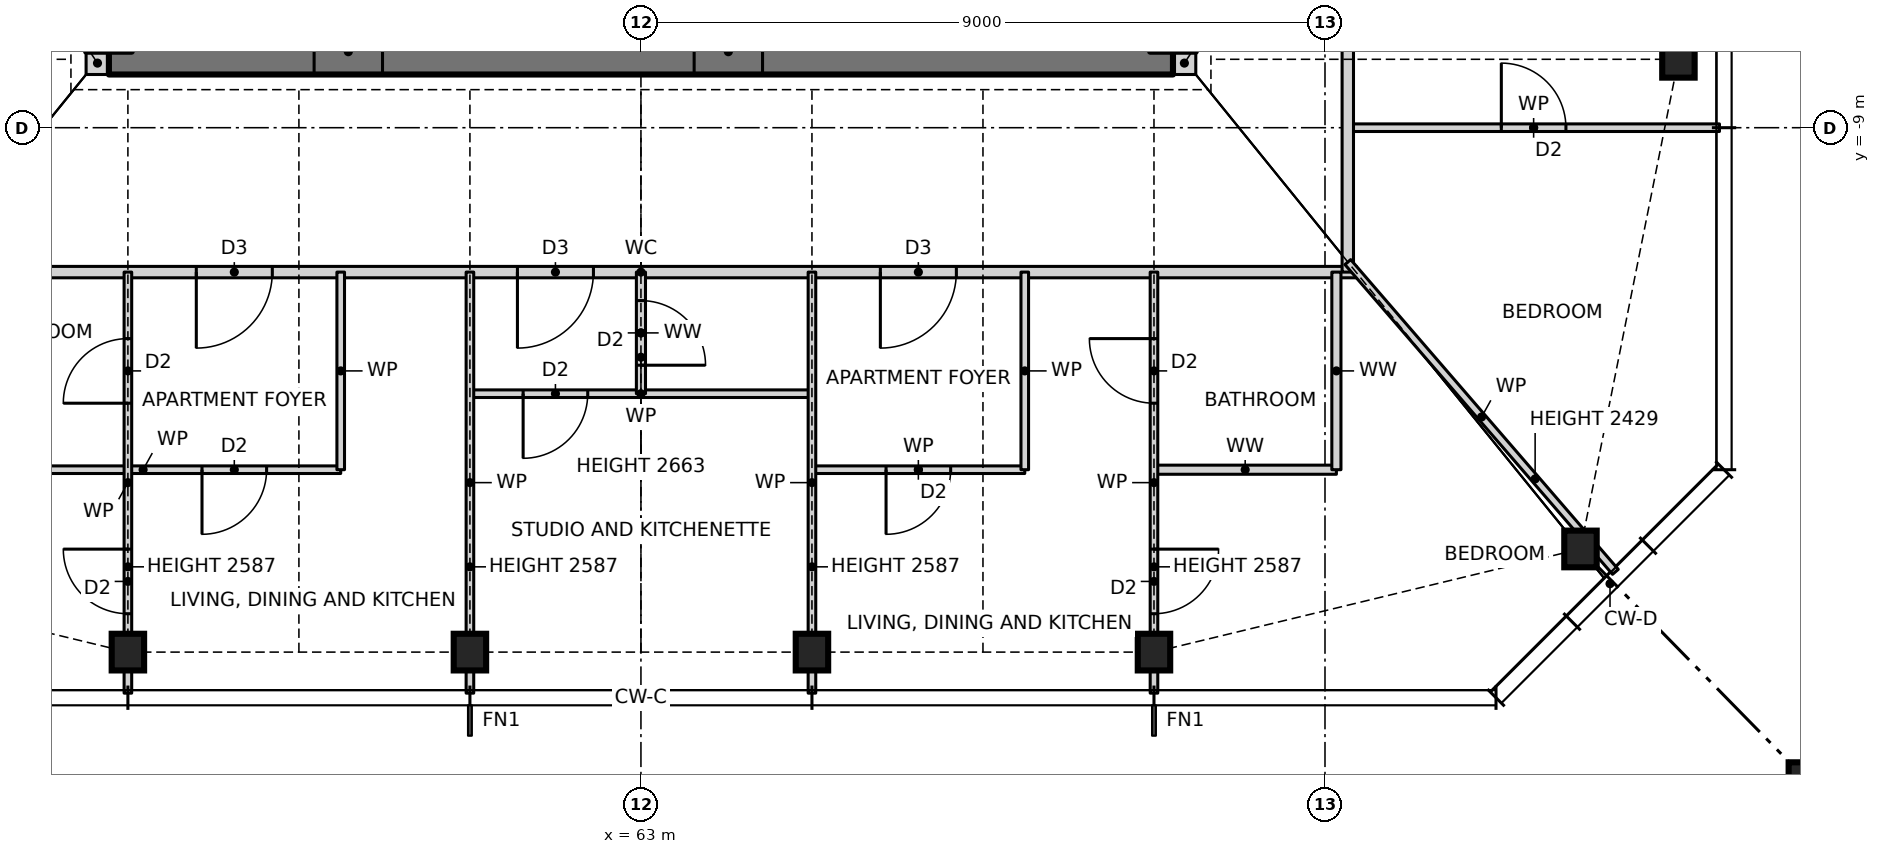
"""IFC4 building model, lengths in metres.
Left out: names, types, materials, properties, quantities, classifications, styles, units other than length and angle.
Written with IfcOpenShell. Run it as: python <this file> out.ifc"""

import sys

from ifc_helpers import new_model, si_unit, direction, frame, frame_2d, origin, origin_2d, place, context, subcontext, project, spatial, rectangle, hollow_rectangle, i_section, extrude, element, fill, save


model = new_model("IFC4")
c1 = context("Model", 3, precision=1e-05, world=origin(), true_north=direction((0.0, 1.0)))
c2 = subcontext(c1, "Body", "Model", "MODEL_VIEW")
j1 = project(units=[si_unit("LENGTHUNIT", "METRE"), si_unit("PLANEANGLEUNIT", "RADIAN")], contexts=[c1])
p1 = place(None, origin())
s1 = spatial("IfcSite", under=j1, at=p1, CompositionType="ELEMENT")
p2 = place(p1, origin())
s2 = spatial("IfcBuilding", under=s1, at=p2, CompositionType="ELEMENT")
p3 = place(p2, frame((0.0, 0.0, 84.0)))
s3 = spatial("IfcBuildingStorey", under=s2, at=p3, CompositionType="ELEMENT", Elevation=84.0)
for number, where, z_axis, x_axis in (
    (1, (56.25, -15.9, 0.0), (0.0, 0.0, 1.0), (1.0, 0.0, 0.0)),
    (2, (60.75, -15.9, 0.0), (0.0, 0.0, 1.0), (1.0, 0.0, 0.0)),
    (3, (65.25, -15.9, 0.0), (0.0, 0.0, 1.0), (1.0, 0.0, 0.0)),
    (4, (69.75, -15.9, 0.0), (0.0, 0.0, 1.0), (1.0, 0.0, 0.0)),
    (5, (75.361, -14.543, 0.0), (0.0, 0.0, 1.0), (1.0, 0.0, 0.0)),
    (6, (76.65, -8.1, 0.0), (0.0, 0.0, 1.0), (1.0, 0.0, 0.0)),
):
    element("IfcColumn", number, at=place(p3, frame(where, z_axis=z_axis, x_axis=x_axis)), inside=s3, PredefinedType="COLUMN", context=c2, shape_type="SweptSolid", body=[
        extrude(i_section(OverallWidth=0.427, OverallDepth=0.483, WebThickness=0.051, FlangeThickness=0.082, at=origin_2d()), origin(), (0.0, 0.0, 1.0), 3.5),
    ])
p4 = place(p3, frame((78.65, -17.9, 0.0), z_axis=(0.0, 0.0, 1.0), x_axis=(1.0, 0.0, 0.0)))
e7 = element("IfcColumn", 7, at=p4, inside=s3, PredefinedType="COLUMN", context=c2, shape_type="SweptSolid", body=[
    extrude(hollow_rectangle(XDim=1.1, YDim=1.1, WallThickness=0.06, at=origin_2d()), origin(), (0.0, 0.0, 1.0), 3.5),
])
for number, where, z_axis, x_axis in (
    (8, (55.7, -8.15, 0.0), (0.0, 0.0, 1.0), (1.0, 0.0, 0.0)),
    (9, (70.0, -8.15, 0.0), (0.0, 0.0, 1.0), (1.0, 0.0, 0.0)),
):
    element("IfcWall", number, at=place(p3, frame(where, z_axis=z_axis, x_axis=x_axis)), inside=s3, PredefinedType="SOLIDWALL", context=c2, shape_type="SweptSolid", body=[
        extrude(rectangle(XDim=0.3, YDim=0.3, at=frame_2d((0.15, 0.0))), origin(), (0.0, 0.0, 1.0), 3.5),
    ])
p5 = place(p3, frame((56.0, -8.0, 0.0), z_axis=(0.0, 0.0, 1.0), x_axis=(1.0, 0.0, 0.0)))
e10 = element("IfcWall", 10, at=p5, inside=s3, PredefinedType="SHEAR", context=c2, shape_type="SweptSolid", body=[
    extrude(rectangle(XDim=14.0, YDim=0.6, at=frame_2d((7.0, 0.0))), origin(), (0.0, 0.0, 1.0), 3.5),
])
p6 = place(p5, frame((2.7, 0.0, 0.0)))
e11 = element("IfcOpeningElement", 11, at=p6, cuts=e10, PredefinedType="OPENING", context=c2, shape_type="SweptSolid", body=[
    extrude(rectangle(XDim=0.9, YDim=2.1, at=frame_2d((0.45, 1.05))), frame((0.0, 0.31, 0.0), z_axis=(0.0, -1.0, 0.0), x_axis=(1.0, 0.0, 0.0)), (0.0, 0.0, 1.0), 0.62),
])
p7 = place(p5, frame((7.7, 0.0, 0.0)))
e12 = element("IfcOpeningElement", 12, at=p7, cuts=e10, PredefinedType="OPENING", context=c2, shape_type="SweptSolid", body=[
    extrude(rectangle(XDim=0.9, YDim=2.1, at=frame_2d((0.45, 1.05))), frame((0.0, 0.31, 0.0), z_axis=(0.0, -1.0, 0.0), x_axis=(1.0, 0.0, 0.0)), (0.0, 0.0, 1.0), 0.62),
])
p8 = place(p3, frame((53.85, -13.5, 0.0), z_axis=(0.0, 0.0, 1.0), x_axis=(1.0, 0.0, 0.0)))
e13 = element("IfcWall", 13, at=p8, inside=s3, PredefinedType="PARTITIONING", context=c2, shape_type="SweptSolid", body=[
    extrude(rectangle(XDim=5.2, YDim=0.1, at=frame_2d((2.6, 0.0))), origin(), (0.0, 0.0, 1.0), 3.27),
])
p9 = place(p8, frame((3.375, 0.0, 0.0)))
e14 = element("IfcOpeningElement", 14, at=p9, cuts=e13, PredefinedType="OPENING", context=c2, shape_type="SweptSolid", body=[
    extrude(rectangle(XDim=0.85, YDim=2.1, at=frame_2d((0.425, 1.05))), frame((0.0, 0.06, 0.0), z_axis=(0.0, -1.0, 0.0), x_axis=(1.0, 0.0, 0.0)), (0.0, 0.0, 1.0), 0.12),
])
p10 = place(p3, frame((65.25, -13.5, 0.0), z_axis=(0.0, 0.0, 1.0), x_axis=(1.0, 0.0, 0.0)))
e15 = element("IfcWall", 15, at=p10, inside=s3, PredefinedType="PARTITIONING", context=c2, shape_type="SweptSolid", body=[
    extrude(rectangle(XDim=2.8, YDim=0.1, at=frame_2d((1.4, 0.0))), origin(), (0.0, 0.0, 1.0), 3.27),
])
p11 = place(p10, frame((0.975, 0.0, 0.0)))
e16 = element("IfcOpeningElement", 16, at=p11, cuts=e15, PredefinedType="OPENING", context=c2, shape_type="SweptSolid", body=[
    extrude(rectangle(XDim=0.85, YDim=2.1, at=frame_2d((0.425, 1.05))), frame((0.0, 0.06, 0.0), z_axis=(0.0, -1.0, 0.0), x_axis=(1.0, 0.0, 0.0)), (0.0, 0.0, 1.0), 0.12),
])
p12 = place(p3, frame((69.75, -13.5, 0.0), z_axis=(0.0, 0.0, 1.0), x_axis=(1.0, 0.0, 0.0)))
e17 = element("IfcWall", 17, at=p12, inside=s3, PredefinedType="PARTITIONING", context=c2, shape_type="SweptSolid", body=[
    extrude(rectangle(XDim=2.4, YDim=0.12, at=frame_2d((1.2, 0.0))), origin(), (0.0, 0.0, 1.0), 3.27),
])
p13 = place(p3, frame((60.75, -12.5, 0.0), z_axis=(0.0, 0.0, 1.0), x_axis=(1.0, 0.0, 0.0)))
e18 = element("IfcWall", 18, at=p13, inside=s3, PredefinedType="PARTITIONING", context=c2, shape_type="SweptSolid", body=[
    extrude(rectangle(XDim=4.5, YDim=0.1, at=frame_2d((2.25, 0.0))), origin(), (0.0, 0.0, 1.0), 3.27),
])
p14 = place(p13, frame((0.7, 0.0, 0.0)))
e19 = element("IfcOpeningElement", 19, at=p14, cuts=e18, PredefinedType="OPENING", context=c2, shape_type="SweptSolid", body=[
    extrude(rectangle(XDim=0.85, YDim=2.1, at=frame_2d((0.425, 1.05))), frame((0.0, 0.06, 0.0), z_axis=(0.0, -1.0, 0.0), x_axis=(1.0, 0.0, 0.0)), (0.0, 0.0, 1.0), 0.12),
])
p15 = place(p3, frame((53.586, -10.9, 0.0), z_axis=(0.0, 0.0, 1.0), x_axis=(1.0, 0.0, 0.0)))
e20 = element("IfcWall", 20, at=p15, inside=s3, PredefinedType="PARTITIONING", context=c2, shape_type="SweptSolid", body=[
    extrude(rectangle(XDim=18.828, YDim=0.15, at=frame_2d((9.414, 0.0))), origin(), (0.0, 0.0, 1.0), 3.27),
])
p16 = place(p15, frame((3.564, 0.0, 0.0)))
e21 = element("IfcOpeningElement", 21, at=p16, cuts=e20, PredefinedType="OPENING", context=c2, shape_type="SweptSolid", body=[
    extrude(rectangle(XDim=1.0, YDim=2.1, at=frame_2d((0.5, 1.05))), frame((0.0, 0.085, 0.0), z_axis=(0.0, -1.0, 0.0), x_axis=(1.0, 0.0, 0.0)), (0.0, 0.0, 1.0), 0.17),
])
p17 = place(p15, frame((7.789, 0.0, 0.0)))
e22 = element("IfcOpeningElement", 22, at=p17, cuts=e20, PredefinedType="OPENING", context=c2, shape_type="SweptSolid", body=[
    extrude(rectangle(XDim=1.0, YDim=2.1, at=frame_2d((0.5, 1.05))), frame((0.0, 0.085, 0.0), z_axis=(0.0, -1.0, 0.0), x_axis=(1.0, 0.0, 0.0)), (0.0, 0.0, 1.0), 0.17),
])
p18 = place(p15, frame((12.564, 0.0, 0.0)))
e23 = element("IfcOpeningElement", 23, at=p18, cuts=e20, PredefinedType="OPENING", context=c2, shape_type="SweptSolid", body=[
    extrude(rectangle(XDim=1.0, YDim=2.1, at=frame_2d((0.5, 1.05))), frame((0.0, 0.085, 0.0), z_axis=(0.0, -1.0, 0.0), x_axis=(1.0, 0.0, 0.0)), (0.0, 0.0, 1.0), 0.17),
])
p19 = place(p3, frame((72.3, -9.0, 0.0), z_axis=(0.0, 0.0, 1.0), x_axis=(1.0, 0.0, 0.0)))
e24 = element("IfcWall", 24, at=p19, inside=s3, PredefinedType="PARTITIONING", context=c2, shape_type="SweptSolid", body=[
    extrude(rectangle(XDim=4.89, YDim=0.1, at=frame_2d((2.445, 0.0))), origin(), (0.0, 0.0, 1.0), 3.27),
])
p20 = place(p19, frame((2.02, 0.0, 0.0)))
e25 = element("IfcOpeningElement", 25, at=p20, cuts=e24, PredefinedType="OPENING", context=c2, shape_type="SweptSolid", body=[
    extrude(rectangle(XDim=0.85, YDim=2.1, at=frame_2d((0.425, 1.05))), frame((0.0, 0.06, 0.0), z_axis=(0.0, -1.0, 0.0), x_axis=(1.0, 0.0, 0.0)), (0.0, 0.0, 1.0), 0.12),
])
p21 = place(p3, frame((72.3, -10.9, 0.0), z_axis=(0.0, 0.0, 1.0), x_axis=(0.0, 1.0, 0.0)))
e26 = element("IfcWall", 26, at=p21, inside=s3, PredefinedType="PARTITIONING", context=c2, shape_type="SweptSolid", body=[
    extrude(rectangle(XDim=21.668, YDim=0.15, at=frame_2d((10.834, 0.0))), origin(), (0.0, 0.0, 1.0), 3.27),
])
p22 = place(p21, frame((10.4, 0.0, 0.0)))
e27 = element("IfcOpeningElement", 27, at=p22, cuts=e26, PredefinedType="OPENING", context=c2, shape_type="SweptSolid", body=[
    extrude(rectangle(XDim=1.0, YDim=2.1, at=frame_2d((0.5, 1.05))), frame((0.0, 0.085, 0.0), z_axis=(0.0, -1.0, 0.0), x_axis=(1.0, 0.0, 0.0)), (0.0, 0.0, 1.0), 0.17),
])
p23 = place(p3, frame((72.15, -13.5, 0.0), z_axis=(0.0, 0.0, 1.0), x_axis=(0.0, 1.0, 0.0)))
e28 = element("IfcWall", 28, at=p23, inside=s3, PredefinedType="PARTITIONING", context=c2, shape_type="SweptSolid", body=[
    extrude(rectangle(XDim=2.6, YDim=0.12, at=frame_2d((1.3, 0.0))), origin(), (0.0, 0.0, 1.0), 3.27),
])
p24 = place(p3, frame((69.75, -16.44, 0.0), z_axis=(0.0, 0.0, 1.0), x_axis=(0.0, 1.0, 0.0)))
e29 = element("IfcWall", 29, at=p24, inside=s3, PredefinedType="PARTITIONING", context=c2, shape_type="SweptSolid", body=[
    extrude(rectangle(XDim=5.54, YDim=0.1, at=frame_2d((2.77, 0.0))), origin(), (0.0, 0.0, 1.0), 2.587),
])
p25 = place(p24, frame((3.815, 0.0, 0.0)))
e30 = element("IfcOpeningElement", 30, at=p25, cuts=e29, PredefinedType="OPENING", context=c2, shape_type="SweptSolid", body=[
    extrude(rectangle(XDim=0.85, YDim=2.1, at=frame_2d((0.425, 1.05))), frame((0.0, 0.06, 0.0), z_axis=(0.0, -1.0, 0.0), x_axis=(1.0, 0.0, 0.0)), (0.0, 0.0, 1.0), 0.12),
])
p26 = place(p24, frame((1.045, 0.0, 0.0)))
e31 = element("IfcOpeningElement", 31, at=p26, cuts=e29, PredefinedType="OPENING", context=c2, shape_type="SweptSolid", body=[
    extrude(rectangle(XDim=0.85, YDim=2.1, at=frame_2d((0.425, 1.05))), frame((0.0, 0.06, 0.0), z_axis=(0.0, -1.0, 0.0), x_axis=(1.0, 0.0, 0.0)), (0.0, 0.0, 1.0), 0.12),
])
p27 = place(p3, frame((68.05, -13.5, 0.0), z_axis=(0.0, 0.0, 1.0), x_axis=(0.0, 1.0, 0.0)))
e32 = element("IfcWall", 32, at=p27, inside=s3, PredefinedType="PARTITIONING", context=c2, shape_type="SweptSolid", body=[
    extrude(rectangle(XDim=2.6, YDim=0.1, at=frame_2d((1.3, 0.0))), origin(), (0.0, 0.0, 1.0), 3.27),
])
p28 = place(p3, frame((65.25, -16.44, 0.0), z_axis=(0.0, 0.0, 1.0), x_axis=(0.0, 1.0, 0.0)))
e33 = element("IfcWall", 33, at=p28, inside=s3, PredefinedType="PARTITIONING", context=c2, shape_type="SweptSolid", body=[
    extrude(rectangle(XDim=5.54, YDim=0.1, at=frame_2d((2.77, 0.0))), origin(), (0.0, 0.0, 1.0), 2.587),
])
p29 = place(p3, frame((63.0, -12.5, 0.0), z_axis=(0.0, 0.0, 1.0), x_axis=(0.0, 1.0, 0.0)))
e34 = element("IfcWall", 34, at=p29, inside=s3, PredefinedType="PARTITIONING", context=c2, shape_type="SweptSolid", body=[
    extrude(rectangle(XDim=1.6, YDim=0.12, at=frame_2d((0.8, 0.0))), origin(), (0.0, 0.0, 1.0), 2.663),
])
p30 = place(p29, frame((0.375, 0.0, 0.0)))
e35 = element("IfcOpeningElement", 35, at=p30, cuts=e34, PredefinedType="OPENING", context=c2, shape_type="SweptSolid", body=[
    extrude(rectangle(XDim=0.85, YDim=2.1, at=frame_2d((0.425, 1.05))), frame((0.0, 0.07, 0.0), z_axis=(0.0, -1.0, 0.0), x_axis=(1.0, 0.0, 0.0)), (0.0, 0.0, 1.0), 0.14),
])
p31 = place(p3, frame((60.75, -16.44, 0.0), z_axis=(0.0, 0.0, 1.0), x_axis=(0.0, 1.0, 0.0)))
e36 = element("IfcWall", 36, at=p31, inside=s3, PredefinedType="PARTITIONING", context=c2, shape_type="SweptSolid", body=[
    extrude(rectangle(XDim=5.54, YDim=0.1, at=frame_2d((2.77, 0.0))), origin(), (0.0, 0.0, 1.0), 2.587),
])
p32 = place(p3, frame((59.05, -13.5, 0.0), z_axis=(0.0, 0.0, 1.0), x_axis=(0.0, 1.0, 0.0)))
e37 = element("IfcWall", 37, at=p32, inside=s3, PredefinedType="PARTITIONING", context=c2, shape_type="SweptSolid", body=[
    extrude(rectangle(XDim=2.6, YDim=0.1, at=frame_2d((1.3, 0.0))), origin(), (0.0, 0.0, 1.0), 3.27),
])
p33 = place(p3, frame((56.25, -16.44, 0.0), z_axis=(0.0, 0.0, 1.0), x_axis=(0.0, 1.0, 0.0)))
e38 = element("IfcWall", 38, at=p33, inside=s3, PredefinedType="PARTITIONING", context=c2, shape_type="SweptSolid", body=[
    extrude(rectangle(XDim=5.54, YDim=0.1, at=frame_2d((2.77, 0.0))), origin(), (0.0, 0.0, 1.0), 2.587),
])
p34 = place(p33, frame((3.815, 0.0, 0.0)))
e39 = element("IfcOpeningElement", 39, at=p34, cuts=e38, PredefinedType="OPENING", context=c2, shape_type="SweptSolid", body=[
    extrude(rectangle(XDim=0.85, YDim=2.1, at=frame_2d((0.425, 1.05))), frame((0.0, 0.06, 0.0), z_axis=(0.0, -1.0, 0.0), x_axis=(1.0, 0.0, 0.0)), (0.0, 0.0, 1.0), 0.12),
])
p35 = place(p33, frame((1.045, 0.0, 0.0)))
e40 = element("IfcOpeningElement", 40, at=p35, cuts=e38, PredefinedType="OPENING", context=c2, shape_type="SweptSolid", body=[
    extrude(rectangle(XDim=0.85, YDim=2.1, at=frame_2d((0.425, 1.05))), frame((0.0, 0.06, 0.0), z_axis=(0.0, -1.0, 0.0), x_axis=(1.0, 0.0, 0.0)), (0.0, 0.0, 1.0), 0.12),
])
p36 = place(p3, frame((75.821, -14.844, 0.0), z_axis=(0.0, 0.0, 1.0), x_axis=(-0.653713095188, 0.756742485381, 0.0)))
e41 = element("IfcWall", 41, at=p36, inside=s3, PredefinedType="PARTITIONING", context=c2, shape_type="SweptSolid", body=[
    extrude(rectangle(XDim=5.386, YDim=0.1, at=frame_2d((2.693, 0.0))), origin(), (0.0, 0.0, 1.0), 2.429),
])
p37 = place(p16, frame((1.0, 0.0, 0.0), z_axis=(0.0, 0.0, 1.0), x_axis=(-1.0, 0.0, 0.0)))
e42 = element("IfcDoor", 42, at=p37, inside=s3, OperationType="SINGLE_SWING_RIGHT", PredefinedType="DOOR", context=c2, shape_type="SweptSolid", body=[
    extrude(rectangle(XDim=1.0, YDim=2.1, at=frame_2d((0.5, 1.05))), frame((0.0, 0.025, 0.0), z_axis=(0.0, -1.0, 0.0), x_axis=(1.0, 0.0, 0.0)), (0.0, 0.0, 1.0), 0.05),
])
fill(e21, e42)
p38 = place(p9, frame((0.85, 0.0, 0.0), z_axis=(0.0, 0.0, 1.0), x_axis=(-1.0, 0.0, 0.0)))
e43 = element("IfcDoor", 43, at=p38, inside=s3, OperationType="SINGLE_SWING_RIGHT", PredefinedType="DOOR", context=c2, shape_type="SweptSolid", body=[
    extrude(rectangle(XDim=0.85, YDim=2.1, at=frame_2d((0.425, 1.05))), frame((0.0, 0.025, 0.0), z_axis=(0.0, -1.0, 0.0), x_axis=(1.0, 0.0, 0.0)), (0.0, 0.0, 1.0), 0.05),
])
fill(e14, e43)
p39 = place(p34, origin())
e44 = element("IfcDoor", 44, at=p39, inside=s3, OperationType="SINGLE_SWING_LEFT", PredefinedType="DOOR", context=c2, shape_type="SweptSolid", body=[
    extrude(rectangle(XDim=0.85, YDim=2.1, at=frame_2d((0.425, 1.05))), frame((0.0, 0.025, 0.0), z_axis=(0.0, -1.0, 0.0), x_axis=(1.0, 0.0, 0.0)), (0.0, 0.0, 1.0), 0.05),
])
fill(e39, e44)
p40 = place(p35, origin())
e45 = element("IfcDoor", 45, at=p40, inside=s3, OperationType="SINGLE_SWING_RIGHT", PredefinedType="DOOR", context=c2, shape_type="SweptSolid", body=[
    extrude(rectangle(XDim=0.85, YDim=2.1, at=frame_2d((0.425, 1.05))), frame((0.0, 0.025, 0.0), z_axis=(0.0, -1.0, 0.0), x_axis=(1.0, 0.0, 0.0)), (0.0, 0.0, 1.0), 0.05),
])
fill(e40, e45)
p41 = place(p14, frame((0.85, 0.0, 0.0), z_axis=(0.0, 0.0, 1.0), x_axis=(-1.0, 0.0, 0.0)))
e46 = element("IfcDoor", 46, at=p41, inside=s3, OperationType="SINGLE_SWING_RIGHT", PredefinedType="DOOR", context=c2, shape_type="SweptSolid", body=[
    extrude(rectangle(XDim=0.85, YDim=2.1, at=frame_2d((0.425, 1.05))), frame((0.0, 0.025, 0.0), z_axis=(0.0, -1.0, 0.0), x_axis=(1.0, 0.0, 0.0)), (0.0, 0.0, 1.0), 0.05),
])
fill(e19, e46)
p42 = place(p17, frame((1.0, 0.0, 0.0), z_axis=(0.0, 0.0, 1.0), x_axis=(-1.0, 0.0, 0.0)))
e47 = element("IfcDoor", 47, at=p42, inside=s3, OperationType="SINGLE_SWING_RIGHT", PredefinedType="DOOR", context=c2, shape_type="SweptSolid", body=[
    extrude(rectangle(XDim=1.0, YDim=2.1, at=frame_2d((0.5, 1.05))), frame((0.0, 0.025, 0.0), z_axis=(0.0, -1.0, 0.0), x_axis=(1.0, 0.0, 0.0)), (0.0, 0.0, 1.0), 0.05),
])
fill(e22, e47)
p43 = place(p30, frame((0.85, 0.0, 0.0), z_axis=(0.0, 0.0, 1.0), x_axis=(-1.0, 0.0, 0.0)))
e48 = element("IfcDoor", 48, at=p43, inside=s3, OperationType="SINGLE_SWING_RIGHT", PredefinedType="DOOR", context=c2, shape_type="SweptSolid", body=[
    extrude(rectangle(XDim=0.85, YDim=2.1, at=frame_2d((0.425, 1.05))), frame((0.0, 0.025, 0.0), z_axis=(0.0, -1.0, 0.0), x_axis=(1.0, 0.0, 0.0)), (0.0, 0.0, 1.0), 0.05),
])
fill(e35, e48)
p44 = place(p18, frame((1.0, 0.0, 0.0), z_axis=(0.0, 0.0, 1.0), x_axis=(-1.0, 0.0, 0.0)))
e49 = element("IfcDoor", 49, at=p44, inside=s3, OperationType="SINGLE_SWING_RIGHT", PredefinedType="DOOR", context=c2, shape_type="SweptSolid", body=[
    extrude(rectangle(XDim=1.0, YDim=2.1, at=frame_2d((0.5, 1.05))), frame((0.0, 0.025, 0.0), z_axis=(0.0, -1.0, 0.0), x_axis=(1.0, 0.0, 0.0)), (0.0, 0.0, 1.0), 0.05),
])
fill(e23, e49)
p45 = place(p11, frame((0.85, 0.0, 0.0), z_axis=(0.0, 0.0, 1.0), x_axis=(-1.0, 0.0, 0.0)))
e50 = element("IfcDoor", 50, at=p45, inside=s3, OperationType="SINGLE_SWING_RIGHT", PredefinedType="DOOR", context=c2, shape_type="SweptSolid", body=[
    extrude(rectangle(XDim=0.85, YDim=2.1, at=frame_2d((0.425, 1.05))), frame((0.0, 0.025, 0.0), z_axis=(0.0, -1.0, 0.0), x_axis=(1.0, 0.0, 0.0)), (0.0, 0.0, 1.0), 0.05),
])
fill(e16, e50)
p46 = place(p25, origin())
e51 = element("IfcDoor", 51, at=p46, inside=s3, OperationType="SINGLE_SWING_RIGHT", PredefinedType="DOOR", context=c2, shape_type="SweptSolid", body=[
    extrude(rectangle(XDim=0.85, YDim=2.1, at=frame_2d((0.425, 1.05))), frame((0.0, 0.025, 0.0), z_axis=(0.0, -1.0, 0.0), x_axis=(1.0, 0.0, 0.0)), (0.0, 0.0, 1.0), 0.05),
])
fill(e30, e51)
p47 = place(p26, frame((0.85, 0.0, 0.0), z_axis=(0.0, 0.0, 1.0), x_axis=(-1.0, 0.0, 0.0)))
e52 = element("IfcDoor", 52, at=p47, inside=s3, OperationType="SINGLE_SWING_LEFT", PredefinedType="DOOR", context=c2, shape_type="SweptSolid", body=[
    extrude(rectangle(XDim=0.85, YDim=2.1, at=frame_2d((0.425, 1.05))), frame((0.0, 0.025, 0.0), z_axis=(0.0, -1.0, 0.0), x_axis=(1.0, 0.0, 0.0)), (0.0, 0.0, 1.0), 0.05),
])
fill(e31, e52)
p48 = place(p20, origin())
e53 = element("IfcDoor", 53, at=p48, inside=s3, OperationType="SINGLE_SWING_LEFT", PredefinedType="DOOR", context=c2, shape_type="SweptSolid", body=[
    extrude(rectangle(XDim=0.85, YDim=2.1, at=frame_2d((0.425, 1.05))), frame((0.0, 0.025, 0.0), z_axis=(0.0, -1.0, 0.0), x_axis=(1.0, 0.0, 0.0)), (0.0, 0.0, 1.0), 0.05),
])
fill(e25, e53)
p49 = place(p6, origin())
e54 = element("IfcDoor", 54, at=p49, inside=s3, OperationType="SINGLE_SWING_LEFT", PredefinedType="DOOR", context=c2, shape_type="SweptSolid", body=[
    extrude(rectangle(XDim=0.9, YDim=2.1, at=frame_2d((0.45, 1.05))), frame((0.0, 0.025, 0.0), z_axis=(0.0, -1.0, 0.0), x_axis=(1.0, 0.0, 0.0)), (0.0, 0.0, 1.0), 0.05),
])
fill(e11, e54)
p50 = place(p7, origin())
e55 = element("IfcDoor", 55, at=p50, inside=s3, OperationType="SINGLE_SWING_LEFT", PredefinedType="DOOR", context=c2, shape_type="SweptSolid", body=[
    extrude(rectangle(XDim=0.9, YDim=2.1, at=frame_2d((0.45, 1.05))), frame((0.0, 0.025, 0.0), z_axis=(0.0, -1.0, 0.0), x_axis=(1.0, 0.0, 0.0)), (0.0, 0.0, 1.0), 0.05),
])
fill(e12, e55)
save(model, sys.argv[1])
